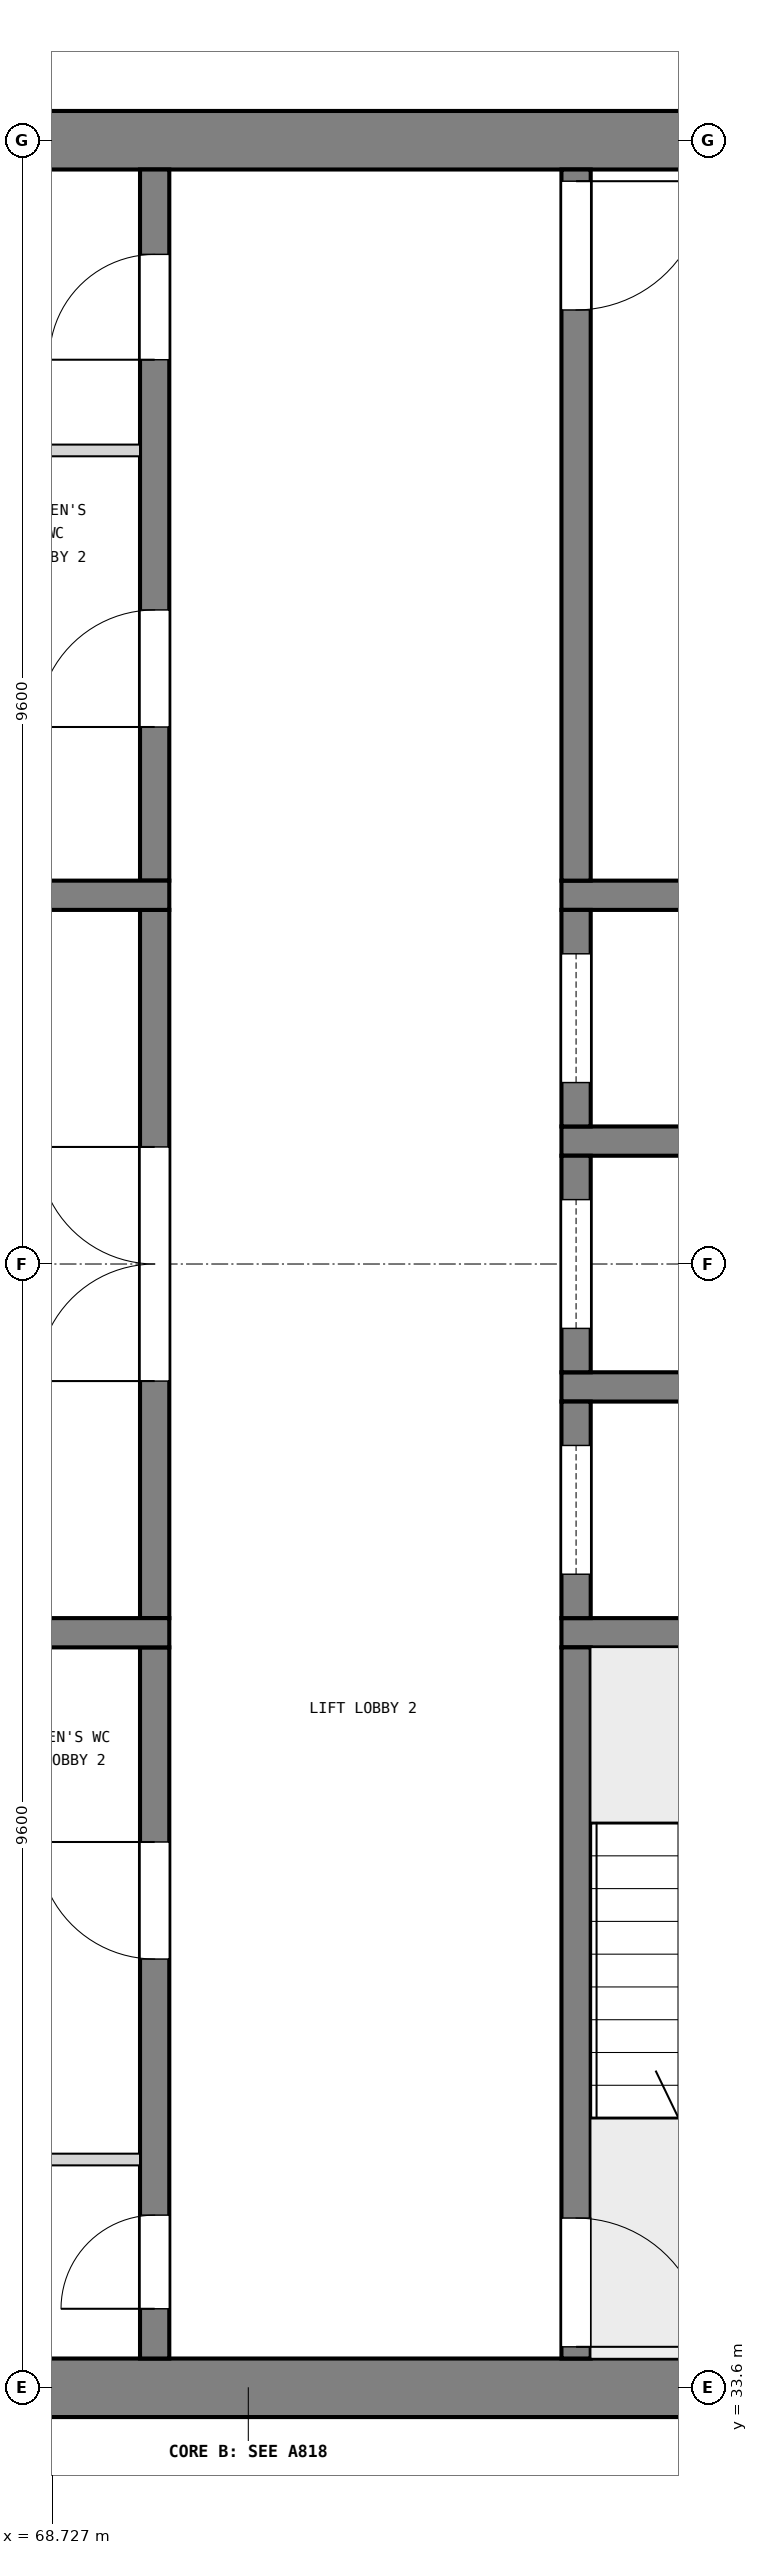
"""IFC4 building model, lengths in metres.
Left out: names, types, materials, properties, quantities, classifications, styles, units other than length and angle.
Written with IfcOpenShell. Run it as: python <this file> out.ifc"""

import sys

from ifc_helpers import new_model, si_unit, direction, frame, frame_2d, origin, place, context, subcontext, project, spatial, rectangle, extrude, element, fill, save


model = new_model("IFC4")
c1 = context("Model", 3, precision=1e-05, world=origin(), true_north=direction((0.0, 1.0)))
c2 = subcontext(c1, "Body", "Model", "MODEL_VIEW")
j1 = project(units=[si_unit("LENGTHUNIT", "METRE"), si_unit("PLANEANGLEUNIT", "RADIAN")], contexts=[c1])
p1 = place(None, origin())
s1 = spatial("IfcSite", under=j1, at=p1, CompositionType="ELEMENT")
p2 = place(p1, origin())
s2 = spatial("IfcBuilding", under=s1, at=p2, CompositionType="ELEMENT")
p3 = place(p2, frame((0.0, 0.0, 64.2)))
s3 = spatial("IfcBuildingStorey", under=s2, at=p3, CompositionType="ELEMENT", Elevation=64.2)
p4 = place(p3, frame((63.75, 52.8, 0.0), z_axis=(0.0, 0.0, 1.0), x_axis=(1.0, 0.0, 0.0)))
e1 = element("IfcWall", 1, at=p4, inside=s3, PredefinedType="SHEAR", context=c2, shape_type="SweptSolid", body=[
    extrude(rectangle(XDim=13.3, YDim=0.5, at=frame_2d((6.65, 0.0))), origin(), (0.0, 0.0, 1.0), 5.1),
])
p5 = place(p4, frame((11.05, 0.0, 1.0)))
e2 = element("IfcOpeningElement", 2, at=p5, cuts=e1, PredefinedType="OPENING", context=c2, shape_type="SweptSolid", body=[
    extrude(rectangle(XDim=0.4, YDim=2.0, at=frame_2d((0.2, 1.0))), frame((0.0, 0.26, 0.0), z_axis=(0.0, -1.0, 0.0), x_axis=(1.0, 0.0, 0.0)), (0.0, 0.0, 1.0), 0.52),
])
p6 = place(p3, frame((63.75, 33.6, 0.0), z_axis=(0.0, 0.0, 1.0), x_axis=(1.0, 0.0, 0.0)))
e3 = element("IfcWall", 3, at=p6, inside=s3, PredefinedType="SHEAR", context=c2, shape_type="SweptSolid", body=[
    extrude(rectangle(XDim=13.3, YDim=0.5, at=frame_2d((6.65, 0.0))), origin(), (0.0, 0.0, 1.0), 5.1),
])
p7 = place(p6, frame((11.05, 0.0, 1.0)))
e4 = element("IfcOpeningElement", 4, at=p7, cuts=e3, PredefinedType="OPENING", context=c2, shape_type="SweptSolid", body=[
    extrude(rectangle(XDim=0.4, YDim=2.0, at=frame_2d((0.2, 1.0))), frame((0.0, 0.26, 0.0), z_axis=(0.0, -1.0, 0.0), x_axis=(1.0, 0.0, 0.0)), (0.0, 0.0, 1.0), 0.52),
])
for number, where, z_axis, x_axis in (
    (5, (76.55, 40.05, 0.0), (0.0, 0.0, 1.0), (-1.0, 0.0, 0.0)),
    (6, (76.55, 42.15, 0.0), (0.0, 0.0, 1.0), (-1.0, 0.0, 0.0)),
    (7, (76.55, 44.25, 0.0), (0.0, 0.0, 1.0), (-1.0, 0.0, 0.0)),
    (8, (76.55, 46.35, 0.0), (0.0, 0.0, 1.0), (-1.0, 0.0, 0.0)),
):
    element("IfcWall", number, at=place(p3, frame(where, z_axis=z_axis, x_axis=x_axis)), inside=s3, PredefinedType="SOLIDWALL", context=c2, shape_type="SweptSolid", body=[
        extrude(rectangle(XDim=3.475, YDim=0.25, at=frame_2d((1.738, 0.0))), origin(), (0.0, 0.0, 1.0), 5.1),
    ])
p8 = place(p3, frame((73.2, 33.85, 0.0), z_axis=(0.0, 0.0, 1.0), x_axis=(0.0, 1.0, 0.0)))
e9 = element("IfcWall", 9, at=p8, inside=s3, PredefinedType="SOLIDWALL", context=c2, shape_type="SweptSolid", body=[
    extrude(rectangle(XDim=6.075, YDim=0.25, at=frame_2d((3.038, 0.0))), origin(), (0.0, 0.0, 1.0), 5.1),
])
p9 = place(p8, frame((0.1, 0.0, 0.0)))
e10 = element("IfcOpeningElement", 10, at=p9, cuts=e9, PredefinedType="OPENING", context=c2, shape_type="SweptSolid", body=[
    extrude(rectangle(XDim=1.1, YDim=2.1, at=frame_2d((0.55, 1.05))), frame((0.0, 0.135, 0.0), z_axis=(0.0, -1.0, 0.0), x_axis=(1.0, 0.0, 0.0)), (0.0, 0.0, 1.0), 0.27),
])
p10 = place(p3, frame((73.2, 40.175, 0.0), z_axis=(0.0, 0.0, 1.0), x_axis=(0.0, 1.0, 0.0)))
e11 = element("IfcWall", 11, at=p10, inside=s3, PredefinedType="SOLIDWALL", context=c2, shape_type="SweptSolid", body=[
    extrude(rectangle(XDim=1.85, YDim=0.25, at=frame_2d((0.925, 0.0))), origin(), (0.0, 0.0, 1.0), 5.1),
])
p11 = place(p10, frame((0.375, 0.0, 0.0)))
e12 = element("IfcOpeningElement", 12, at=p11, cuts=e11, PredefinedType="OPENING", context=c2, shape_type="SweptSolid", body=[
    extrude(rectangle(XDim=1.1, YDim=2.1, at=frame_2d((0.55, 1.05))), frame((0.0, 0.135, 0.0), z_axis=(0.0, -1.0, 0.0), x_axis=(1.0, 0.0, 0.0)), (0.0, 0.0, 1.0), 0.27),
])
p12 = place(p3, frame((73.2, 42.275, 0.0), z_axis=(0.0, 0.0, 1.0), x_axis=(0.0, 1.0, 0.0)))
e13 = element("IfcWall", 13, at=p12, inside=s3, PredefinedType="SOLIDWALL", context=c2, shape_type="SweptSolid", body=[
    extrude(rectangle(XDim=1.85, YDim=0.25, at=frame_2d((0.925, 0.0))), origin(), (0.0, 0.0, 1.0), 5.1),
])
p13 = place(p12, frame((0.375, 0.0, 0.0)))
e14 = element("IfcOpeningElement", 14, at=p13, cuts=e13, PredefinedType="OPENING", context=c2, shape_type="SweptSolid", body=[
    extrude(rectangle(XDim=1.1, YDim=2.1, at=frame_2d((0.55, 1.05))), frame((0.0, 0.135, 0.0), z_axis=(0.0, -1.0, 0.0), x_axis=(1.0, 0.0, 0.0)), (0.0, 0.0, 1.0), 0.27),
])
p14 = place(p3, frame((73.2, 44.375, 0.0), z_axis=(0.0, 0.0, 1.0), x_axis=(0.0, 1.0, 0.0)))
e15 = element("IfcWall", 15, at=p14, inside=s3, PredefinedType="SOLIDWALL", context=c2, shape_type="SweptSolid", body=[
    extrude(rectangle(XDim=1.85, YDim=0.25, at=frame_2d((0.925, 0.0))), origin(), (0.0, 0.0, 1.0), 5.1),
])
p15 = place(p14, frame((0.375, 0.0, 0.0)))
e16 = element("IfcOpeningElement", 16, at=p15, cuts=e15, PredefinedType="OPENING", context=c2, shape_type="SweptSolid", body=[
    extrude(rectangle(XDim=1.1, YDim=2.1, at=frame_2d((0.55, 1.05))), frame((0.0, 0.135, 0.0), z_axis=(0.0, -1.0, 0.0), x_axis=(1.0, 0.0, 0.0)), (0.0, 0.0, 1.0), 0.27),
])
p16 = place(p3, frame((73.2, 46.475, 0.0), z_axis=(0.0, 0.0, 1.0), x_axis=(0.0, 1.0, 0.0)))
e17 = element("IfcWall", 17, at=p16, inside=s3, PredefinedType="SOLIDWALL", context=c2, shape_type="SweptSolid", body=[
    extrude(rectangle(XDim=6.075, YDim=0.25, at=frame_2d((3.038, 0.0))), origin(), (0.0, 0.0, 1.0), 5.1),
])
p17 = place(p16, frame((4.875, 0.0, 0.0)))
e18 = element("IfcOpeningElement", 18, at=p17, cuts=e17, PredefinedType="OPENING", context=c2, shape_type="SweptSolid", body=[
    extrude(rectangle(XDim=1.1, YDim=2.1, at=frame_2d((0.55, 1.05))), frame((0.0, 0.135, 0.0), z_axis=(0.0, -1.0, 0.0), x_axis=(1.0, 0.0, 0.0)), (0.0, 0.0, 1.0), 0.27),
])
p18 = place(p3, frame((69.6, 33.85, 0.0), z_axis=(0.0, 0.0, 1.0), x_axis=(0.0, 1.0, 0.0)))
e19 = element("IfcWall", 19, at=p18, inside=s3, PredefinedType="SOLIDWALL", context=c2, shape_type="SweptSolid", body=[
    extrude(rectangle(XDim=6.075, YDim=0.25, at=frame_2d((3.038, 0.0))), origin(), (0.0, 0.0, 1.0), 5.1),
])
p19 = place(p18, frame((0.425, 0.0, 0.0)))
e20 = element("IfcOpeningElement", 20, at=p19, cuts=e19, PredefinedType="OPENING", context=c2, shape_type="SweptSolid", body=[
    extrude(rectangle(XDim=0.8, YDim=2.1, at=frame_2d((0.4, 1.05))), frame((0.0, 0.135, 0.0), z_axis=(0.0, -1.0, 0.0), x_axis=(1.0, 0.0, 0.0)), (0.0, 0.0, 1.0), 0.27),
])
p20 = place(p18, frame((3.413, 0.0, 0.0)))
e21 = element("IfcOpeningElement", 21, at=p20, cuts=e19, PredefinedType="OPENING", context=c2, shape_type="SweptSolid", body=[
    extrude(rectangle(XDim=1.0, YDim=2.1, at=frame_2d((0.5, 1.05))), frame((0.0, 0.135, 0.0), z_axis=(0.0, -1.0, 0.0), x_axis=(1.0, 0.0, 0.0)), (0.0, 0.0, 1.0), 0.27),
])
p21 = place(p3, frame((69.6, 40.175, 0.0), z_axis=(0.0, 0.0, 1.0), x_axis=(0.0, 1.0, 0.0)))
e22 = element("IfcWall", 22, at=p21, inside=s3, PredefinedType="SOLIDWALL", context=c2, shape_type="SweptSolid", body=[
    extrude(rectangle(XDim=6.05, YDim=0.25, at=frame_2d((3.025, 0.0))), origin(), (0.0, 0.0, 1.0), 5.1),
])
p22 = place(p21, frame((2.025, 0.0, 0.0)))
e23 = element("IfcOpeningElement", 23, at=p22, cuts=e22, PredefinedType="OPENING", context=c2, shape_type="SweptSolid", body=[
    extrude(rectangle(XDim=2.0, YDim=2.1, at=frame_2d((1.0, 1.05))), frame((0.0, 0.135, 0.0), z_axis=(0.0, -1.0, 0.0), x_axis=(1.0, 0.0, 0.0)), (0.0, 0.0, 1.0), 0.27),
])
p23 = place(p3, frame((69.6, 46.475, 0.0), z_axis=(0.0, 0.0, 1.0), x_axis=(0.0, 1.0, 0.0)))
e24 = element("IfcWall", 24, at=p23, inside=s3, PredefinedType="SOLIDWALL", context=c2, shape_type="SweptSolid", body=[
    extrude(rectangle(XDim=6.075, YDim=0.25, at=frame_2d((3.038, 0.0))), origin(), (0.0, 0.0, 1.0), 5.1),
])
p24 = place(p23, frame((1.312, 0.0, 0.0)))
e25 = element("IfcOpeningElement", 25, at=p24, cuts=e24, PredefinedType="OPENING", context=c2, shape_type="SweptSolid", body=[
    extrude(rectangle(XDim=1.0, YDim=2.1, at=frame_2d((0.5, 1.05))), frame((0.0, 0.135, 0.0), z_axis=(0.0, -1.0, 0.0), x_axis=(1.0, 0.0, 0.0)), (0.0, 0.0, 1.0), 0.27),
])
p25 = place(p23, frame((4.45, 0.0, 0.0)))
e26 = element("IfcOpeningElement", 26, at=p25, cuts=e24, PredefinedType="OPENING", context=c2, shape_type="SweptSolid", body=[
    extrude(rectangle(XDim=0.9, YDim=2.1, at=frame_2d((0.45, 1.05))), frame((0.0, 0.135, 0.0), z_axis=(0.0, -1.0, 0.0), x_axis=(1.0, 0.0, 0.0)), (0.0, 0.0, 1.0), 0.27),
])
for number, where, z_axis, x_axis in (
    (27, (69.725, 40.05, 0.0), (0.0, 0.0, 1.0), (-1.0, 0.0, 0.0)),
    (28, (69.725, 46.35, 0.0), (0.0, 0.0, 1.0), (-1.0, 0.0, 0.0)),
):
    element("IfcWall", number, at=place(p3, frame(where, z_axis=z_axis, x_axis=x_axis)), inside=s3, PredefinedType="SOLIDWALL", context=c2, shape_type="SweptSolid", body=[
        extrude(rectangle(XDim=5.475, YDim=0.25, at=frame_2d((2.738, 0.0))), origin(), (0.0, 0.0, 1.0), 5.1),
    ])
for number, where, z_axis, x_axis in (
    (29, (69.475, 35.55, 0.0), (0.0, 0.0, 1.0), (-1.0, 0.0, 0.0)),
    (30, (69.475, 50.15, 0.0), (0.0, 0.0, 1.0), (-1.0, 0.0, 0.0)),
):
    element("IfcWall", number, at=place(p3, frame(where, z_axis=z_axis, x_axis=x_axis)), inside=s3, PredefinedType="PARTITIONING", context=c2, shape_type="SweptSolid", body=[
        extrude(rectangle(XDim=5.225, YDim=0.1, at=frame_2d((2.613, 0.0))), origin(), (0.0, 0.0, 1.0), 5.1),
    ])
p26 = place(p2, frame((0.0, 0.0, 69.3)))
p27 = place(p26, frame((73.2, 33.85, 0.3), z_axis=(0.0, 0.0, 1.0), x_axis=(0.0, 1.0, 0.0)))
p28 = place(p27, frame((4.712, 0.0, 0.13)))
p29 = place(p28, origin())
e31 = element("IfcDoor", 31, at=p29, inside=s3, OperationType="SINGLE_SWING_LEFT", PredefinedType="DOOR", context=c2, shape_type="SweptSolid", body=[
    extrude(rectangle(XDim=1.1, YDim=2.1, at=frame_2d((0.55, 1.05))), frame((0.0, 0.025, 0.0), z_axis=(0.0, -1.0, 0.0), x_axis=(1.0, 0.0, 0.0)), (0.0, 0.0, 1.0), 0.05),
])
p30 = place(p9, frame((1.1, 0.0, 0.0), z_axis=(0.0, 0.0, 1.0), x_axis=(-1.0, 0.0, 0.0)))
e32 = element("IfcDoor", 32, at=p30, inside=s3, OperationType="SINGLE_SWING_RIGHT", PredefinedType="DOOR", context=c2, shape_type="SweptSolid", body=[
    extrude(rectangle(XDim=1.1, YDim=2.1, at=frame_2d((0.55, 1.05))), frame((0.0, 0.025, 0.0), z_axis=(0.0, -1.0, 0.0), x_axis=(1.0, 0.0, 0.0)), (0.0, 0.0, 1.0), 0.05),
])
fill(e10, e32)
p31 = place(p17, frame((1.1, 0.0, 0.0), z_axis=(0.0, 0.0, 1.0), x_axis=(-1.0, 0.0, 0.0)))
e33 = element("IfcDoor", 33, at=p31, inside=s3, OperationType="SINGLE_SWING_LEFT", PredefinedType="DOOR", context=c2, shape_type="SweptSolid", body=[
    extrude(rectangle(XDim=1.1, YDim=2.1, at=frame_2d((0.55, 1.05))), frame((0.0, 0.025, 0.0), z_axis=(0.0, -1.0, 0.0), x_axis=(1.0, 0.0, 0.0)), (0.0, 0.0, 1.0), 0.05),
])
fill(e18, e33)
p32 = place(p11, origin())
e34 = element("IfcDoor", 34, at=p32, inside=s3, OperationType="SLIDING_TO_LEFT", PredefinedType="DOOR", context=c2, shape_type="SweptSolid", body=[
    extrude(rectangle(XDim=1.1, YDim=2.1, at=frame_2d((0.55, 1.05))), frame((0.0, 0.025, 0.0), z_axis=(0.0, -1.0, 0.0), x_axis=(1.0, 0.0, 0.0)), (0.0, 0.0, 1.0), 0.05),
])
fill(e12, e34)
p33 = place(p13, origin())
e35 = element("IfcDoor", 35, at=p33, inside=s3, OperationType="SLIDING_TO_LEFT", PredefinedType="DOOR", context=c2, shape_type="SweptSolid", body=[
    extrude(rectangle(XDim=1.1, YDim=2.1, at=frame_2d((0.55, 1.05))), frame((0.0, 0.025, 0.0), z_axis=(0.0, -1.0, 0.0), x_axis=(1.0, 0.0, 0.0)), (0.0, 0.0, 1.0), 0.05),
])
fill(e14, e35)
p34 = place(p15, origin())
e36 = element("IfcDoor", 36, at=p34, inside=s3, OperationType="SLIDING_TO_LEFT", PredefinedType="DOOR", context=c2, shape_type="SweptSolid", body=[
    extrude(rectangle(XDim=1.1, YDim=2.1, at=frame_2d((0.55, 1.05))), frame((0.0, 0.025, 0.0), z_axis=(0.0, -1.0, 0.0), x_axis=(1.0, 0.0, 0.0)), (0.0, 0.0, 1.0), 0.05),
])
fill(e16, e36)
p35 = place(p22, origin())
e37 = element("IfcDoor", 37, at=p35, inside=s3, OperationType="DOUBLE_DOOR_SINGLE_SWING", PredefinedType="DOOR", context=c2, shape_type="SweptSolid", body=[
    extrude(rectangle(XDim=2.0, YDim=2.1, at=frame_2d((1.0, 1.05))), frame((0.0, 0.025, 0.0), z_axis=(0.0, -1.0, 0.0), x_axis=(1.0, 0.0, 0.0)), (0.0, 0.0, 1.0), 0.05),
])
fill(e23, e37)
p36 = place(p19, origin())
e38 = element("IfcDoor", 38, at=p36, inside=s3, OperationType="SINGLE_SWING_LEFT", PredefinedType="DOOR", context=c2, shape_type="SweptSolid", body=[
    extrude(rectangle(XDim=0.8, YDim=2.1, at=frame_2d((0.4, 1.05))), frame((0.0, 0.025, 0.0), z_axis=(0.0, -1.0, 0.0), x_axis=(1.0, 0.0, 0.0)), (0.0, 0.0, 1.0), 0.05),
])
fill(e20, e38)
p37 = place(p20, origin())
e39 = element("IfcDoor", 39, at=p37, inside=s3, OperationType="SINGLE_SWING_RIGHT", PredefinedType="DOOR", context=c2, shape_type="SweptSolid", body=[
    extrude(rectangle(XDim=1.0, YDim=2.1, at=frame_2d((0.5, 1.05))), frame((0.0, 0.025, 0.0), z_axis=(0.0, -1.0, 0.0), x_axis=(1.0, 0.0, 0.0)), (0.0, 0.0, 1.0), 0.05),
])
fill(e21, e39)
p38 = place(p24, origin())
e40 = element("IfcDoor", 40, at=p38, inside=s3, OperationType="SINGLE_SWING_LEFT", PredefinedType="DOOR", context=c2, shape_type="SweptSolid", body=[
    extrude(rectangle(XDim=1.0, YDim=2.1, at=frame_2d((0.5, 1.05))), frame((0.0, 0.025, 0.0), z_axis=(0.0, -1.0, 0.0), x_axis=(1.0, 0.0, 0.0)), (0.0, 0.0, 1.0), 0.05),
])
fill(e25, e40)
p39 = place(p25, origin())
e41 = element("IfcDoor", 41, at=p39, inside=s3, OperationType="SINGLE_SWING_LEFT", PredefinedType="DOOR", context=c2, shape_type="SweptSolid", body=[
    extrude(rectangle(XDim=0.9, YDim=2.1, at=frame_2d((0.45, 1.05))), frame((0.0, 0.025, 0.0), z_axis=(0.0, -1.0, 0.0), x_axis=(1.0, 0.0, 0.0)), (0.0, 0.0, 1.0), 0.05),
])
fill(e26, e41)
save(model, sys.argv[1])
